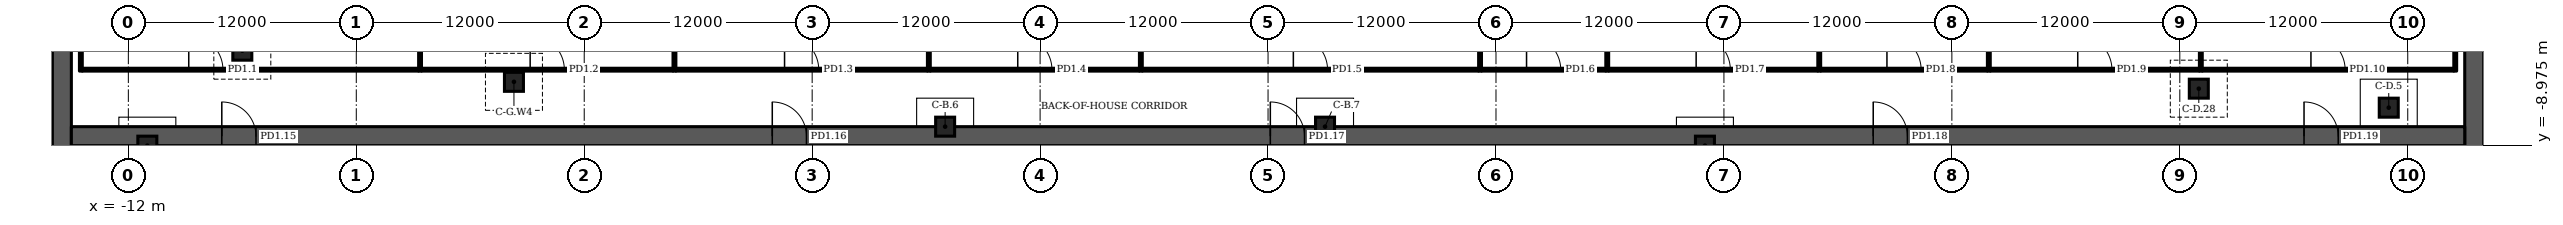
"""IFC4 building model, lengths in metres.
Left out: names, types, materials, properties, quantities, classifications, styles, units other than length and angle.
Written with IfcOpenShell. Run it as: python <this file> out.ifc"""

import sys

from ifc_helpers import new_model, si_unit, direction, frame, frame_2d, origin, origin_2d, place, context, subcontext, project, spatial, rectangle, extrude, element, fill, save


model = new_model("IFC4")
c1 = context("Model", 3, precision=1e-05, world=origin(), true_north=direction((0.0, 1.0)))
c2 = subcontext(c1, "Body", "Model", "MODEL_VIEW")
j1 = project(units=[si_unit("LENGTHUNIT", "METRE"), si_unit("PLANEANGLEUNIT", "RADIAN")], contexts=[c1])
p1 = place(None, origin())
s1 = spatial("IfcSite", under=j1, at=p1, CompositionType="ELEMENT")
p2 = place(p1, origin())
s2 = spatial("IfcBuilding", under=s1, at=p2, CompositionType="ELEMENT")
p3 = place(p2, frame((0.0, 0.0, -7.2)))
s3 = spatial("IfcBuildingStorey", under=s2, at=p3, CompositionType="ELEMENT", Elevation=-7.2)
for number, where, z_axis, x_axis in (
    (1, (-15.5, -35.0, 0.0), (0.0, 0.0, 1.0), (0.0, 1.0, 0.0)),
    (2, (111.5, -35.0, 0.0), (0.0, 0.0, 1.0), (0.0, 1.0, 0.0)),
):
    element("IfcWall", number, at=place(p3, frame(where, z_axis=z_axis, x_axis=x_axis)), inside=s3, PredefinedType="SOLIDWALL", context=c2, shape_type="SweptSolid", body=[
        extrude(rectangle(XDim=94.0, YDim=1.0, at=frame_2d((47.0, 0.0))), origin(), (0.0, 0.0, 1.0), 6.6),
    ])
p4 = place(p3, frame((-15.0, -8.5, 0.0), z_axis=(0.0, 0.0, 1.0), x_axis=(1.0, 0.0, 0.0)))
e3 = element("IfcWall", 3, at=p4, inside=s3, PredefinedType="SOLIDWALL", context=c2, shape_type="SweptSolid", body=[
    extrude(rectangle(XDim=126.0, YDim=1.0, at=frame_2d((63.0, 0.0))), origin(), (0.0, 0.0, 1.0), 6.6),
])
p5 = place(p4, frame((7.92, 0.0, 0.0)))
e4 = element("IfcOpeningElement", 4, at=p5, cuts=e3, PredefinedType="OPENING", context=c2, shape_type="SweptSolid", body=[
    extrude(rectangle(XDim=1.8, YDim=2.1, at=frame_2d((0.9, 1.05))), frame((0.0, 0.51, 0.0), z_axis=(0.0, -1.0, 0.0), x_axis=(1.0, 0.0, 0.0)), (0.0, 0.0, 1.0), 1.02),
])
p6 = place(p4, frame((36.9, 0.0, 0.0)))
e5 = element("IfcOpeningElement", 5, at=p6, cuts=e3, PredefinedType="OPENING", context=c2, shape_type="SweptSolid", body=[
    extrude(rectangle(XDim=1.8, YDim=2.1, at=frame_2d((0.9, 1.05))), frame((0.0, 0.51, 0.0), z_axis=(0.0, -1.0, 0.0), x_axis=(1.0, 0.0, 0.0)), (0.0, 0.0, 1.0), 1.02),
])
p7 = place(p4, frame((63.12, 0.0, 0.0)))
e6 = element("IfcOpeningElement", 6, at=p7, cuts=e3, PredefinedType="OPENING", context=c2, shape_type="SweptSolid", body=[
    extrude(rectangle(XDim=1.8, YDim=2.1, at=frame_2d((0.9, 1.05))), frame((0.0, 0.51, 0.0), z_axis=(0.0, -1.0, 0.0), x_axis=(1.0, 0.0, 0.0)), (0.0, 0.0, 1.0), 1.02),
])
p8 = place(p4, frame((94.86, 0.0, 0.0)))
e7 = element("IfcOpeningElement", 7, at=p8, cuts=e3, PredefinedType="OPENING", context=c2, shape_type="SweptSolid", body=[
    extrude(rectangle(XDim=1.8, YDim=2.1, at=frame_2d((0.9, 1.05))), frame((0.0, 0.51, 0.0), z_axis=(0.0, -1.0, 0.0), x_axis=(1.0, 0.0, 0.0)), (0.0, 0.0, 1.0), 1.02),
])
p9 = place(p4, frame((117.54, 0.0, 0.0)))
e8 = element("IfcOpeningElement", 8, at=p9, cuts=e3, PredefinedType="OPENING", context=c2, shape_type="SweptSolid", body=[
    extrude(rectangle(XDim=1.8, YDim=2.1, at=frame_2d((0.9, 1.05))), frame((0.0, 0.51, 0.0), z_axis=(0.0, -1.0, 0.0), x_axis=(1.0, 0.0, 0.0)), (0.0, 0.0, 1.0), 1.02),
])
for number, where, z_axis, x_axis in (
    (9, (8.3, -5.64, 0.0), (0.0, 0.0, 1.0), (1.0, 0.0, 0.0)),
    (10, (-11.0, -9.0, 0.0), (0.0, 0.0, 1.0), (1.0, 0.0, 0.0)),
    (11, (107.0, -7.0, 0.0), (0.0, 0.0, 1.0), (1.0, 0.0, 0.0)),
    (12, (-6.0, -4.0, 0.0), (0.0, 0.0, 1.0), (1.0, 0.0, 0.0)),
    (13, (97.0, -6.0, 0.0), (0.0, 0.0, 1.0), (1.0, 0.0, 0.0)),
    (14, (31.0, -8.0, 0.0), (0.0, 0.0, 1.0), (1.0, 0.0, 0.0)),
    (15, (51.0, -8.0, 0.0), (0.0, 0.0, 1.0), (1.0, 0.0, 0.0)),
    (16, (71.0, -9.0, 0.0), (0.0, 0.0, 1.0), (1.0, 0.0, 0.0)),
):
    element("IfcColumn", number, at=place(p3, frame(where, z_axis=z_axis, x_axis=x_axis)), inside=s3, PredefinedType="COLUMN", context=c2, shape_type="SweptSolid", body=[
        extrude(rectangle(XDim=1.0, YDim=1.0, at=origin_2d()), origin(), (0.0, 0.0, 1.0), 7.2),
    ])
p10 = place(p3, frame((-14.425, -5.0, 0.0), z_axis=(0.0, 0.0, 1.0), x_axis=(1.0, 0.0, 0.0)))
e17 = element("IfcWall", 17, at=p10, inside=s3, PredefinedType="PARTITIONING", context=c2, shape_type="SweptSolid", body=[
    extrude(rectangle(XDim=17.707, YDim=0.15, at=frame_2d((8.854, 0.0))), origin(), (0.0, 0.0, 1.0), 6.9),
])
p11 = place(p10, frame((5.605, 0.0, 0.0)))
e18 = element("IfcOpeningElement", 18, at=p11, cuts=e17, PredefinedType="OPENING", context=c2, shape_type="SweptSolid", body=[
    extrude(rectangle(XDim=1.8, YDim=2.1, at=frame_2d((0.9, 1.05))), frame((0.0, 0.085, 0.0), z_axis=(0.0, -1.0, 0.0), x_axis=(1.0, 0.0, 0.0)), (0.0, 0.0, 1.0), 0.17),
])
p12 = place(p3, frame((3.432, -5.0, 0.0), z_axis=(0.0, 0.0, 1.0), x_axis=(1.0, 0.0, 0.0)))
e19 = element("IfcWall", 19, at=p12, inside=s3, PredefinedType="PARTITIONING", context=c2, shape_type="SweptSolid", body=[
    extrude(rectangle(XDim=13.243, YDim=0.15, at=frame_2d((6.622, 0.0))), origin(), (0.0, 0.0, 1.0), 6.9),
])
p13 = place(p12, frame((5.722, 0.0, 0.0)))
e20 = element("IfcOpeningElement", 20, at=p13, cuts=e19, PredefinedType="OPENING", context=c2, shape_type="SweptSolid", body=[
    extrude(rectangle(XDim=1.8, YDim=2.1, at=frame_2d((0.9, 1.05))), frame((0.0, 0.085, 0.0), z_axis=(0.0, -1.0, 0.0), x_axis=(1.0, 0.0, 0.0)), (0.0, 0.0, 1.0), 0.17),
])
p14 = place(p3, frame((16.825, -5.0, 0.0), z_axis=(0.0, 0.0, 1.0), x_axis=(1.0, 0.0, 0.0)))
e21 = element("IfcWall", 21, at=p14, inside=s3, PredefinedType="PARTITIONING", context=c2, shape_type="SweptSolid", body=[
    extrude(rectangle(XDim=13.243, YDim=0.15, at=frame_2d((6.622, 0.0))), origin(), (0.0, 0.0, 1.0), 6.9),
])
p15 = place(p14, frame((5.721, 0.0, 0.0)))
e22 = element("IfcOpeningElement", 22, at=p15, cuts=e21, PredefinedType="OPENING", context=c2, shape_type="SweptSolid", body=[
    extrude(rectangle(XDim=1.8, YDim=2.1, at=frame_2d((0.9, 1.05))), frame((0.0, 0.085, 0.0), z_axis=(0.0, -1.0, 0.0), x_axis=(1.0, 0.0, 0.0)), (0.0, 0.0, 1.0), 0.17),
])
p16 = place(p3, frame((30.218, -5.0, 0.0), z_axis=(0.0, 0.0, 1.0), x_axis=(1.0, 0.0, 0.0)))
e23 = element("IfcWall", 23, at=p16, inside=s3, PredefinedType="PARTITIONING", context=c2, shape_type="SweptSolid", body=[
    extrude(rectangle(XDim=11.011, YDim=0.15, at=frame_2d((5.505, 0.0))), origin(), (0.0, 0.0, 1.0), 6.9),
])
p17 = place(p16, frame((4.605, 0.0, 0.0)))
e24 = element("IfcOpeningElement", 24, at=p17, cuts=e23, PredefinedType="OPENING", context=c2, shape_type="SweptSolid", body=[
    extrude(rectangle(XDim=1.8, YDim=2.1, at=frame_2d((0.9, 1.05))), frame((0.0, 0.085, 0.0), z_axis=(0.0, -1.0, 0.0), x_axis=(1.0, 0.0, 0.0)), (0.0, 0.0, 1.0), 0.17),
])
p18 = place(p3, frame((41.379, -5.0, 0.0), z_axis=(0.0, 0.0, 1.0), x_axis=(1.0, 0.0, 0.0)))
e25 = element("IfcWall", 25, at=p18, inside=s3, PredefinedType="PARTITIONING", context=c2, shape_type="SweptSolid", body=[
    extrude(rectangle(XDim=17.707, YDim=0.15, at=frame_2d((8.854, 0.0))), origin(), (0.0, 0.0, 1.0), 6.9),
])
p19 = place(p18, frame((7.953, 0.0, 0.0)))
e26 = element("IfcOpeningElement", 26, at=p19, cuts=e25, PredefinedType="OPENING", context=c2, shape_type="SweptSolid", body=[
    extrude(rectangle(XDim=1.8, YDim=2.1, at=frame_2d((0.9, 1.05))), frame((0.0, 0.085, 0.0), z_axis=(0.0, -1.0, 0.0), x_axis=(1.0, 0.0, 0.0)), (0.0, 0.0, 1.0), 0.17),
])
p20 = place(p3, frame((59.236, -5.0, 0.0), z_axis=(0.0, 0.0, 1.0), x_axis=(1.0, 0.0, 0.0)))
e27 = element("IfcWall", 27, at=p20, inside=s3, PredefinedType="PARTITIONING", context=c2, shape_type="SweptSolid", body=[
    extrude(rectangle(XDim=6.546, YDim=0.15, at=frame_2d((3.273, 0.0))), origin(), (0.0, 0.0, 1.0), 6.9),
])
p21 = place(p20, frame((2.373, 0.0, 0.0)))
e28 = element("IfcOpeningElement", 28, at=p21, cuts=e27, PredefinedType="OPENING", context=c2, shape_type="SweptSolid", body=[
    extrude(rectangle(XDim=1.8, YDim=2.1, at=frame_2d((0.9, 1.05))), frame((0.0, 0.085, 0.0), z_axis=(0.0, -1.0, 0.0), x_axis=(1.0, 0.0, 0.0)), (0.0, 0.0, 1.0), 0.17),
])
p22 = place(p3, frame((65.932, -5.0, 0.0), z_axis=(0.0, 0.0, 1.0), x_axis=(1.0, 0.0, 0.0)))
e29 = element("IfcWall", 29, at=p22, inside=s3, PredefinedType="PARTITIONING", context=c2, shape_type="SweptSolid", body=[
    extrude(rectangle(XDim=11.011, YDim=0.15, at=frame_2d((5.506, 0.0))), origin(), (0.0, 0.0, 1.0), 6.9),
])
p23 = place(p22, frame((4.605, 0.0, 0.0)))
e30 = element("IfcOpeningElement", 30, at=p23, cuts=e29, PredefinedType="OPENING", context=c2, shape_type="SweptSolid", body=[
    extrude(rectangle(XDim=1.8, YDim=2.1, at=frame_2d((0.9, 1.05))), frame((0.0, 0.085, 0.0), z_axis=(0.0, -1.0, 0.0), x_axis=(1.0, 0.0, 0.0)), (0.0, 0.0, 1.0), 0.17),
])
p24 = place(p3, frame((77.093, -5.0, 0.0), z_axis=(0.0, 0.0, 1.0), x_axis=(1.0, 0.0, 0.0)))
e31 = element("IfcWall", 31, at=p24, inside=s3, PredefinedType="PARTITIONING", context=c2, shape_type="SweptSolid", body=[
    extrude(rectangle(XDim=8.778, YDim=0.15, at=frame_2d((4.389, 0.0))), origin(), (0.0, 0.0, 1.0), 6.9),
])
p25 = place(p24, frame((3.489, 0.0, 0.0)))
e32 = element("IfcOpeningElement", 32, at=p25, cuts=e31, PredefinedType="OPENING", context=c2, shape_type="SweptSolid", body=[
    extrude(rectangle(XDim=1.8, YDim=2.1, at=frame_2d((0.9, 1.05))), frame((0.0, 0.085, 0.0), z_axis=(0.0, -1.0, 0.0), x_axis=(1.0, 0.0, 0.0)), (0.0, 0.0, 1.0), 0.17),
])
p26 = place(p3, frame((86.021, -5.0, 0.0), z_axis=(0.0, 0.0, 1.0), x_axis=(1.0, 0.0, 0.0)))
e33 = element("IfcWall", 33, at=p26, inside=s3, PredefinedType="PARTITIONING", context=c2, shape_type="SweptSolid", body=[
    extrude(rectangle(XDim=11.011, YDim=0.15, at=frame_2d((5.505, 0.0))), origin(), (0.0, 0.0, 1.0), 6.9),
])
p27 = place(p26, frame((4.606, 0.0, 0.0)))
e34 = element("IfcOpeningElement", 34, at=p27, cuts=e33, PredefinedType="OPENING", context=c2, shape_type="SweptSolid", body=[
    extrude(rectangle(XDim=1.8, YDim=2.1, at=frame_2d((0.9, 1.05))), frame((0.0, 0.085, 0.0), z_axis=(0.0, -1.0, 0.0), x_axis=(1.0, 0.0, 0.0)), (0.0, 0.0, 1.0), 0.17),
])
p28 = place(p3, frame((97.182, -5.0, 0.0), z_axis=(0.0, 0.0, 1.0), x_axis=(1.0, 0.0, 0.0)))
e35 = element("IfcWall", 35, at=p28, inside=s3, PredefinedType="PARTITIONING", context=c2, shape_type="SweptSolid", body=[
    extrude(rectangle(XDim=13.243, YDim=0.15, at=frame_2d((6.622, 0.0))), origin(), (0.0, 0.0, 1.0), 6.9),
])
p29 = place(p28, frame((5.722, 0.0, 0.0)))
e36 = element("IfcOpeningElement", 36, at=p29, cuts=e35, PredefinedType="OPENING", context=c2, shape_type="SweptSolid", body=[
    extrude(rectangle(XDim=1.8, YDim=2.1, at=frame_2d((0.9, 1.05))), frame((0.0, 0.085, 0.0), z_axis=(0.0, -1.0, 0.0), x_axis=(1.0, 0.0, 0.0)), (0.0, 0.0, 1.0), 0.17),
])
for number, where, z_axis, x_axis in (
    (37, (3.357, -5.075, 0.0), (0.0, 0.0, 1.0), (0.0, 1.0, 0.0)),
    (38, (-14.5, -5.075, 0.0), (0.0, 0.0, 1.0), (0.0, 1.0, 0.0)),
    (39, (16.75, -5.075, 0.0), (0.0, 0.0, 1.0), (0.0, 1.0, 0.0)),
    (40, (30.143, -5.075, 0.0), (0.0, 0.0, 1.0), (0.0, 1.0, 0.0)),
):
    element("IfcWall", number, at=place(p3, frame(where, z_axis=z_axis, x_axis=x_axis)), inside=s3, PredefinedType="PARTITIONING", context=c2, shape_type="SweptSolid", body=[
        extrude(rectangle(XDim=14.15, YDim=0.15, at=frame_2d((7.075, 0.0))), origin(), (0.0, 0.0, 1.0), 6.9),
    ])
p30 = place(p3, frame((41.304, -5.075, 0.0), z_axis=(0.0, 0.0, 1.0), x_axis=(0.0, 1.0, 0.0)))
e41 = element("IfcWall", 41, at=p30, inside=s3, PredefinedType="PARTITIONING", context=c2, shape_type="SweptSolid", body=[
    extrude(rectangle(XDim=6.565, YDim=0.15, at=frame_2d((3.282, 0.0))), origin(), (0.0, 0.0, 1.0), 6.9),
])
for number, where, z_axis, x_axis in (
    (42, (59.161, -5.075, 0.0), (0.0, 0.0, 1.0), (0.0, 1.0, 0.0)),
    (43, (65.857, -5.075, 0.0), (0.0, 0.0, 1.0), (0.0, 1.0, 0.0)),
    (44, (77.018, -5.075, 0.0), (0.0, 0.0, 1.0), (0.0, 1.0, 0.0)),
    (45, (85.946, -5.075, 0.0), (0.0, 0.0, 1.0), (0.0, 1.0, 0.0)),
    (46, (97.107, -5.075, 0.0), (0.0, 0.0, 1.0), (0.0, 1.0, 0.0)),
    (47, (110.5, -5.075, 0.0), (0.0, 0.0, 1.0), (0.0, 1.0, 0.0)),
):
    element("IfcWall", number, at=place(p3, frame(where, z_axis=z_axis, x_axis=x_axis)), inside=s3, PredefinedType="PARTITIONING", context=c2, shape_type="SweptSolid", body=[
        extrude(rectangle(XDim=14.15, YDim=0.15, at=frame_2d((7.075, 0.0))), origin(), (0.0, 0.0, 1.0), 6.9),
    ])
p31 = place(p11, origin())
e48 = element("IfcDoor", 48, at=p31, inside=s3, OperationType="DOUBLE_DOOR_SINGLE_SWING", PredefinedType="DOOR", context=c2, shape_type="SweptSolid", body=[
    extrude(rectangle(XDim=1.8, YDim=2.1, at=frame_2d((0.9, 1.05))), frame((0.0, 0.025, 0.0), z_axis=(0.0, -1.0, 0.0), x_axis=(1.0, 0.0, 0.0)), (0.0, 0.0, 1.0), 0.05),
])
fill(e18, e48)
p32 = place(p13, origin())
e49 = element("IfcDoor", 49, at=p32, inside=s3, OperationType="DOUBLE_DOOR_SINGLE_SWING", PredefinedType="DOOR", context=c2, shape_type="SweptSolid", body=[
    extrude(rectangle(XDim=1.8, YDim=2.1, at=frame_2d((0.9, 1.05))), frame((0.0, 0.025, 0.0), z_axis=(0.0, -1.0, 0.0), x_axis=(1.0, 0.0, 0.0)), (0.0, 0.0, 1.0), 0.05),
])
fill(e20, e49)
p33 = place(p15, origin())
e50 = element("IfcDoor", 50, at=p33, inside=s3, OperationType="DOUBLE_DOOR_SINGLE_SWING", PredefinedType="DOOR", context=c2, shape_type="SweptSolid", body=[
    extrude(rectangle(XDim=1.8, YDim=2.1, at=frame_2d((0.9, 1.05))), frame((0.0, 0.025, 0.0), z_axis=(0.0, -1.0, 0.0), x_axis=(1.0, 0.0, 0.0)), (0.0, 0.0, 1.0), 0.05),
])
fill(e22, e50)
p34 = place(p17, origin())
e51 = element("IfcDoor", 51, at=p34, inside=s3, OperationType="DOUBLE_DOOR_SINGLE_SWING", PredefinedType="DOOR", context=c2, shape_type="SweptSolid", body=[
    extrude(rectangle(XDim=1.8, YDim=2.1, at=frame_2d((0.9, 1.05))), frame((0.0, 0.025, 0.0), z_axis=(0.0, -1.0, 0.0), x_axis=(1.0, 0.0, 0.0)), (0.0, 0.0, 1.0), 0.05),
])
fill(e24, e51)
p35 = place(p19, origin())
e52 = element("IfcDoor", 52, at=p35, inside=s3, OperationType="DOUBLE_DOOR_SINGLE_SWING", PredefinedType="DOOR", context=c2, shape_type="SweptSolid", body=[
    extrude(rectangle(XDim=1.8, YDim=2.1, at=frame_2d((0.9, 1.05))), frame((0.0, 0.025, 0.0), z_axis=(0.0, -1.0, 0.0), x_axis=(1.0, 0.0, 0.0)), (0.0, 0.0, 1.0), 0.05),
])
fill(e26, e52)
p36 = place(p21, origin())
e53 = element("IfcDoor", 53, at=p36, inside=s3, OperationType="DOUBLE_DOOR_SINGLE_SWING", PredefinedType="DOOR", context=c2, shape_type="SweptSolid", body=[
    extrude(rectangle(XDim=1.8, YDim=2.1, at=frame_2d((0.9, 1.05))), frame((0.0, 0.025, 0.0), z_axis=(0.0, -1.0, 0.0), x_axis=(1.0, 0.0, 0.0)), (0.0, 0.0, 1.0), 0.05),
])
fill(e28, e53)
p37 = place(p23, origin())
e54 = element("IfcDoor", 54, at=p37, inside=s3, OperationType="DOUBLE_DOOR_SINGLE_SWING", PredefinedType="DOOR", context=c2, shape_type="SweptSolid", body=[
    extrude(rectangle(XDim=1.8, YDim=2.1, at=frame_2d((0.9, 1.05))), frame((0.0, 0.025, 0.0), z_axis=(0.0, -1.0, 0.0), x_axis=(1.0, 0.0, 0.0)), (0.0, 0.0, 1.0), 0.05),
])
fill(e30, e54)
p38 = place(p25, origin())
e55 = element("IfcDoor", 55, at=p38, inside=s3, OperationType="DOUBLE_DOOR_SINGLE_SWING", PredefinedType="DOOR", context=c2, shape_type="SweptSolid", body=[
    extrude(rectangle(XDim=1.8, YDim=2.1, at=frame_2d((0.9, 1.05))), frame((0.0, 0.025, 0.0), z_axis=(0.0, -1.0, 0.0), x_axis=(1.0, 0.0, 0.0)), (0.0, 0.0, 1.0), 0.05),
])
fill(e32, e55)
p39 = place(p27, origin())
e56 = element("IfcDoor", 56, at=p39, inside=s3, OperationType="DOUBLE_DOOR_SINGLE_SWING", PredefinedType="DOOR", context=c2, shape_type="SweptSolid", body=[
    extrude(rectangle(XDim=1.8, YDim=2.1, at=frame_2d((0.9, 1.05))), frame((0.0, 0.025, 0.0), z_axis=(0.0, -1.0, 0.0), x_axis=(1.0, 0.0, 0.0)), (0.0, 0.0, 1.0), 0.05),
])
fill(e34, e56)
p40 = place(p29, origin())
e57 = element("IfcDoor", 57, at=p40, inside=s3, OperationType="DOUBLE_DOOR_SINGLE_SWING", PredefinedType="DOOR", context=c2, shape_type="SweptSolid", body=[
    extrude(rectangle(XDim=1.8, YDim=2.1, at=frame_2d((0.9, 1.05))), frame((0.0, 0.025, 0.0), z_axis=(0.0, -1.0, 0.0), x_axis=(1.0, 0.0, 0.0)), (0.0, 0.0, 1.0), 0.05),
])
fill(e36, e57)
p41 = place(p5, origin())
e58 = element("IfcDoor", 58, at=p41, inside=s3, OperationType="DOUBLE_DOOR_SINGLE_SWING", PredefinedType="DOOR", context=c2, shape_type="SweptSolid", body=[
    extrude(rectangle(XDim=1.8, YDim=2.1, at=frame_2d((0.9, 1.05))), frame((0.0, 0.025, 0.0), z_axis=(0.0, -1.0, 0.0), x_axis=(1.0, 0.0, 0.0)), (0.0, 0.0, 1.0), 0.05),
])
fill(e4, e58)
p42 = place(p6, origin())
e59 = element("IfcDoor", 59, at=p42, inside=s3, OperationType="DOUBLE_DOOR_SINGLE_SWING", PredefinedType="DOOR", context=c2, shape_type="SweptSolid", body=[
    extrude(rectangle(XDim=1.8, YDim=2.1, at=frame_2d((0.9, 1.05))), frame((0.0, 0.025, 0.0), z_axis=(0.0, -1.0, 0.0), x_axis=(1.0, 0.0, 0.0)), (0.0, 0.0, 1.0), 0.05),
])
fill(e5, e59)
p43 = place(p7, origin())
e60 = element("IfcDoor", 60, at=p43, inside=s3, OperationType="DOUBLE_DOOR_SINGLE_SWING", PredefinedType="DOOR", context=c2, shape_type="SweptSolid", body=[
    extrude(rectangle(XDim=1.8, YDim=2.1, at=frame_2d((0.9, 1.05))), frame((0.0, 0.025, 0.0), z_axis=(0.0, -1.0, 0.0), x_axis=(1.0, 0.0, 0.0)), (0.0, 0.0, 1.0), 0.05),
])
fill(e6, e60)
p44 = place(p8, origin())
e61 = element("IfcDoor", 61, at=p44, inside=s3, OperationType="DOUBLE_DOOR_SINGLE_SWING", PredefinedType="DOOR", context=c2, shape_type="SweptSolid", body=[
    extrude(rectangle(XDim=1.8, YDim=2.1, at=frame_2d((0.9, 1.05))), frame((0.0, 0.025, 0.0), z_axis=(0.0, -1.0, 0.0), x_axis=(1.0, 0.0, 0.0)), (0.0, 0.0, 1.0), 0.05),
])
fill(e7, e61)
p45 = place(p9, origin())
e62 = element("IfcDoor", 62, at=p45, inside=s3, OperationType="DOUBLE_DOOR_SINGLE_SWING", PredefinedType="DOOR", context=c2, shape_type="SweptSolid", body=[
    extrude(rectangle(XDim=1.8, YDim=2.1, at=frame_2d((0.9, 1.05))), frame((0.0, 0.025, 0.0), z_axis=(0.0, -1.0, 0.0), x_axis=(1.0, 0.0, 0.0)), (0.0, 0.0, 1.0), 0.05),
])
fill(e8, e62)
save(model, sys.argv[1])
